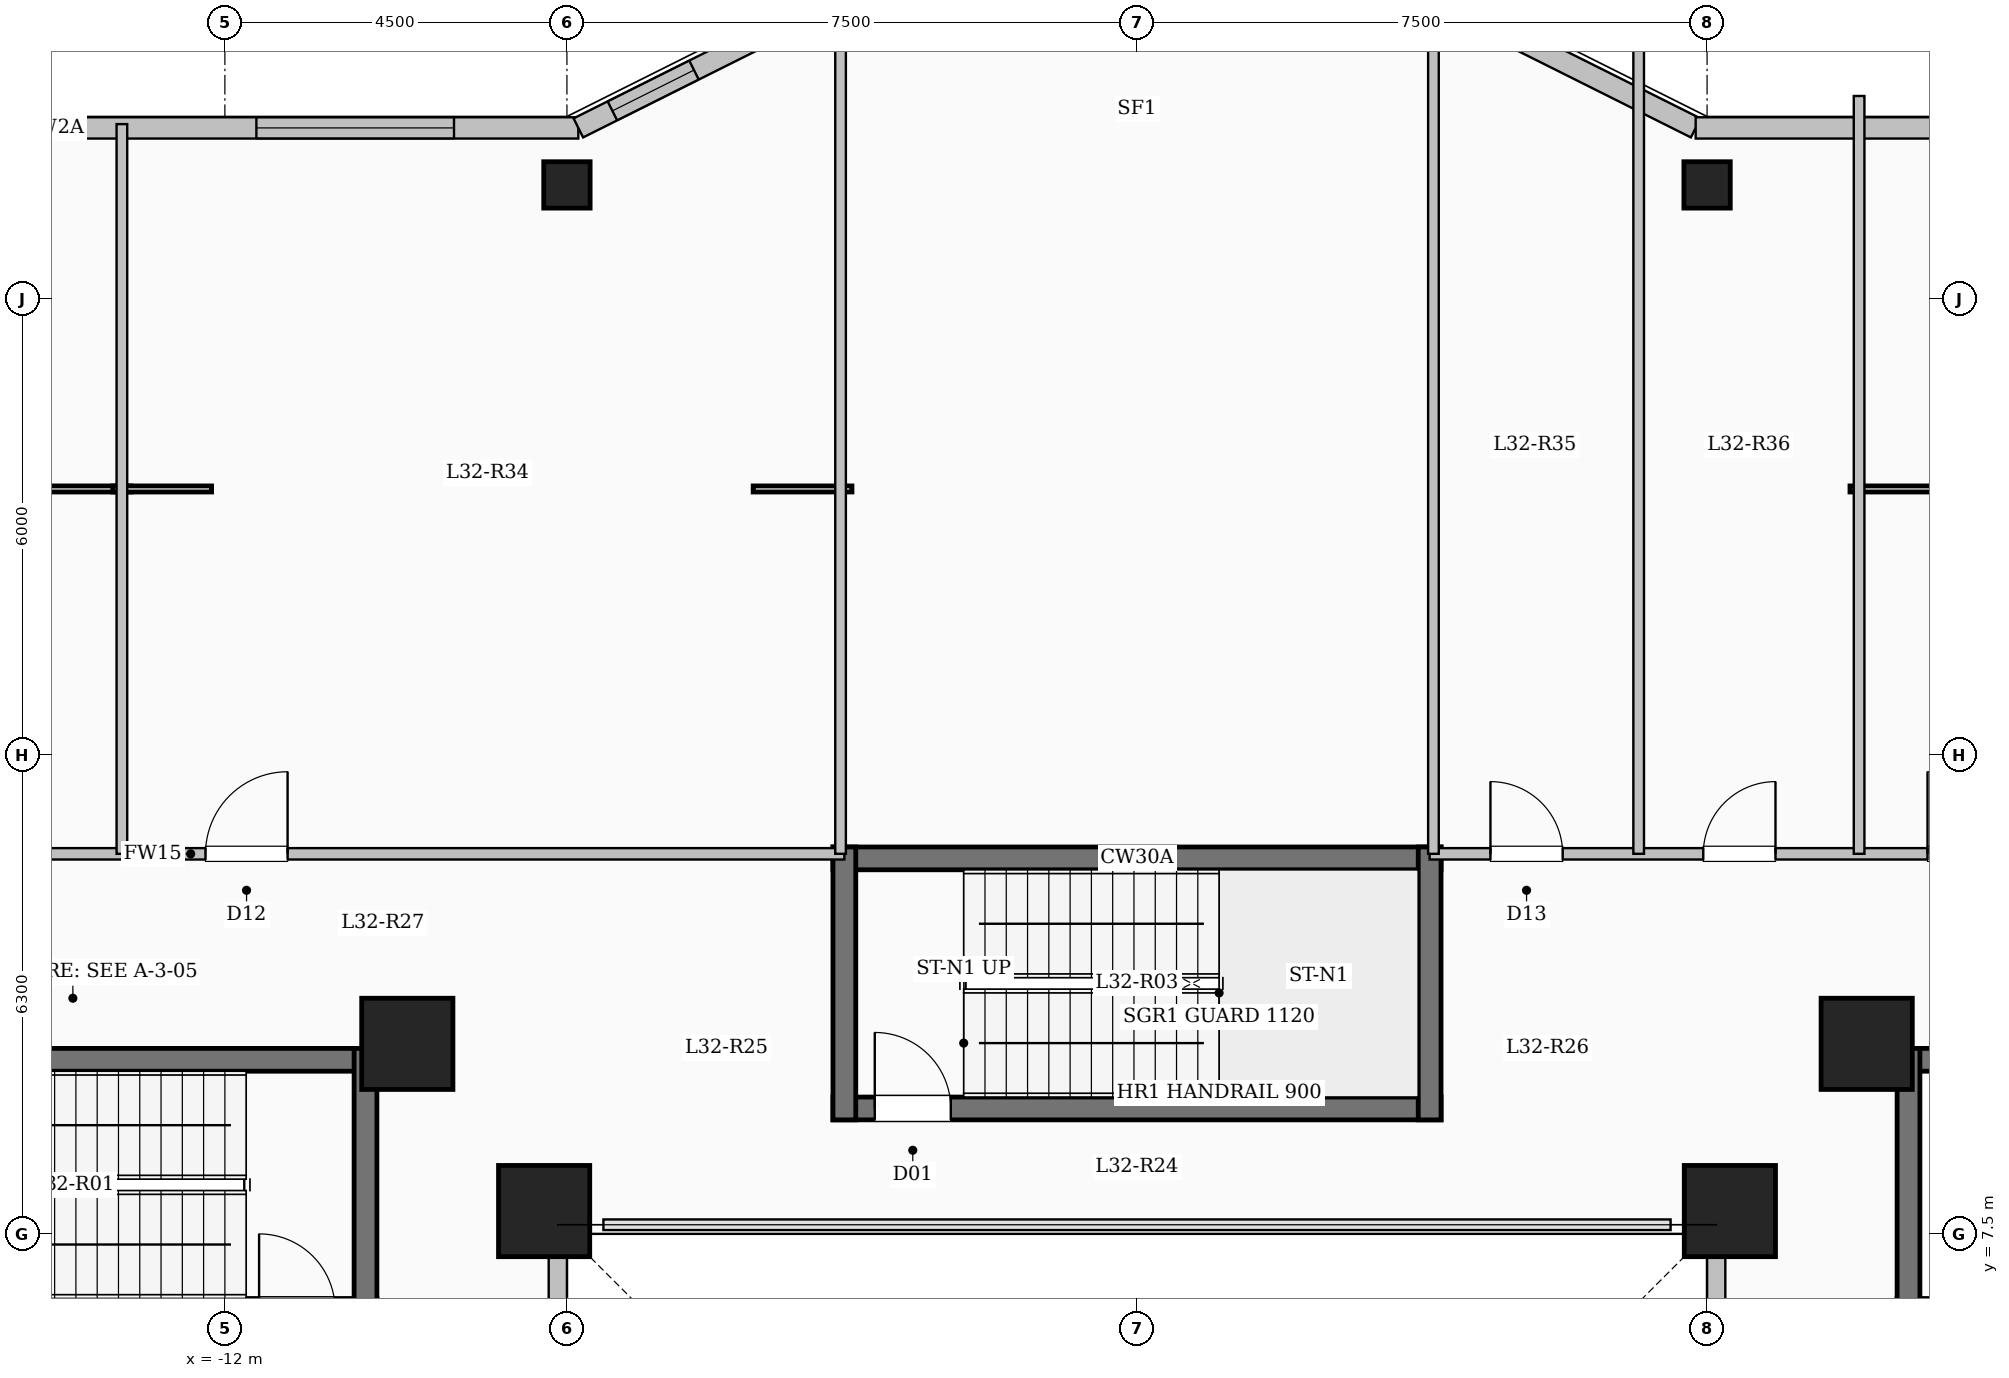
"""IFC4 building model, lengths in metres.
Left out: names, types, materials, properties, quantities, classifications, styles, units other than length and angle.
Written with IfcOpenShell. Run it as: python <this file> out.ifc"""

import sys

from ifc_helpers import new_model, si_unit, direction, frame, frame_2d, origin, origin_2d, place, context, subcontext, project, spatial, rectangle, hollow_circle, extrude, element, fill, save


model = new_model("IFC4")
c1 = context("Model", 3, precision=1e-05, world=origin(), true_north=direction((0.0, 1.0)))
c2 = subcontext(c1, "Body", "Model", "MODEL_VIEW")
j1 = project(units=[si_unit("LENGTHUNIT", "METRE"), si_unit("PLANEANGLEUNIT", "RADIAN")], contexts=[c1])
p1 = place(None, origin())
s1 = spatial("IfcSite", under=j1, at=p1, CompositionType="ELEMENT")
p2 = place(p1, origin())
s2 = spatial("IfcBuilding", under=s1, at=p2, CompositionType="ELEMENT")
p3 = place(p2, frame((0.0, 0.0, 118.5)))
s3 = spatial("IfcBuildingStorey", under=s2, at=p3, CompositionType="ELEMENT", Elevation=118.5)
for number, where, z_axis, x_axis in (
    (1, (-7.8, 7.8, 0.0), (0.0, 0.0, 1.0), (1.0, 0.0, 0.0)),
    (2, (7.8, 7.8, 0.0), (0.0, 0.0, 1.0), (1.0, 0.0, 0.0)),
    (3, (-9.6, 10.0, 0.0), (0.0, 0.0, 1.0), (1.0, 0.0, 0.0)),
    (4, (9.6, 10.0, 0.0), (0.0, 0.0, 1.0), (1.0, 0.0, 0.0)),
):
    element("IfcColumn", number, at=place(p3, frame(where, z_axis=z_axis, x_axis=x_axis)), inside=s3, PredefinedType="COLUMN", context=c2, shape_type="SweptSolid", body=[
        extrude(rectangle(XDim=1.2, YDim=1.2, at=origin_2d()), origin(), (0.0, 0.0, 1.0), 4.5),
    ])
for number, where, z_axis, x_axis in (
    (5, (-7.5, 21.3, 0.0), (0.0, 0.0, 1.0), (1.0, 0.0, 0.0)),
    (6, (7.5, 21.3, 0.0), (0.0, 0.0, 1.0), (1.0, 0.0, 0.0)),
):
    element("IfcColumn", number, at=place(p3, frame(where, z_axis=z_axis, x_axis=x_axis)), inside=s3, PredefinedType="COLUMN", context=c2, shape_type="SweptSolid", body=[
        extrude(hollow_circle(Radius=0.305, WallThickness=0.025, at=origin_2d()), origin(), (0.0, 0.0, 1.0), 4.5),
    ])
p4 = place(p3, frame((7.62, -7.62, 0.0), z_axis=(0.0, 0.0, 1.0), x_axis=(0.0, 1.0, 0.0)))
e7 = element("IfcWall", 7, at=p4, inside=s3, PredefinedType="SOLIDWALL", context=c2, shape_type="SweptSolid", body=[
    extrude(rectangle(XDim=15.24, YDim=0.24, at=frame_2d((7.62, 0.0))), origin(), (0.0, 0.0, 1.0), 4.2),
])
p5 = place(p4, frame((6.92, 0.0, 0.95)))
e8 = element("IfcOpeningElement", 8, at=p5, cuts=e7, PredefinedType="OPENING", context=c2, shape_type="SweptSolid", body=[
    extrude(rectangle(XDim=1.4, YDim=1.5, at=frame_2d((0.7, 0.75))), frame((0.0, 0.13, 0.0), z_axis=(0.0, -1.0, 0.0), x_axis=(1.0, 0.0, 0.0)), (0.0, 0.0, 1.0), 0.26),
])
p6 = place(p3, frame((-7.62, 7.62, 0.0), z_axis=(0.0, 0.0, 1.0), x_axis=(0.0, -1.0, 0.0)))
e9 = element("IfcWall", 9, at=p6, inside=s3, PredefinedType="SOLIDWALL", context=c2, shape_type="SweptSolid", body=[
    extrude(rectangle(XDim=15.24, YDim=0.24, at=frame_2d((7.62, 0.0))), origin(), (0.0, 0.0, 1.0), 4.2),
])
p7 = place(p6, frame((6.92, 0.0, 0.95)))
e10 = element("IfcOpeningElement", 10, at=p7, cuts=e9, PredefinedType="OPENING", context=c2, shape_type="SweptSolid", body=[
    extrude(rectangle(XDim=1.4, YDim=1.5, at=frame_2d((0.7, 0.75))), frame((0.0, 0.13, 0.0), z_axis=(0.0, -1.0, 0.0), x_axis=(1.0, 0.0, 0.0)), (0.0, 0.0, 1.0), 0.26),
])
p8 = place(p3, frame((-21.15, 22.05, 0.0), z_axis=(0.0, 0.0, 1.0), x_axis=(1.0, 0.0, 0.0)))
e11 = element("IfcWall", 11, at=p8, inside=s3, PredefinedType="SOLIDWALL", context=c2, shape_type="SweptSolid", body=[
    extrude(rectangle(XDim=13.8, YDim=0.28, at=frame_2d((6.9, 0.0))), origin(), (0.0, 0.0, 1.0), 4.2),
])
p9 = place(p8, frame((2.589, 0.0, 0.85)))
e12 = element("IfcOpeningElement", 12, at=p9, cuts=e11, PredefinedType="OPENING", context=c2, shape_type="SweptSolid", body=[
    extrude(rectangle(XDim=2.6, YDim=2.4, at=frame_2d((1.3, 1.2))), frame((0.0, 0.15, 0.0), z_axis=(0.0, -1.0, 0.0), x_axis=(1.0, 0.0, 0.0)), (0.0, 0.0, 1.0), 0.3),
])
p10 = place(p8, frame((9.564, 0.0, 0.85)))
e13 = element("IfcOpeningElement", 13, at=p10, cuts=e11, PredefinedType="OPENING", context=c2, shape_type="SweptSolid", body=[
    extrude(rectangle(XDim=2.6, YDim=2.4, at=frame_2d((1.3, 1.2))), frame((0.0, 0.15, 0.0), z_axis=(0.0, -1.0, 0.0), x_axis=(1.0, 0.0, 0.0)), (0.0, 0.0, 1.0), 0.3),
])
p11 = place(p3, frame((-7.35, 22.05, 0.0), z_axis=(0.0, 0.0, 1.0), x_axis=(0.894427191, 0.4472135955, 0.0)))
e14 = element("IfcWall", 14, at=p11, inside=s3, PredefinedType="SOLIDWALL", context=c2, shape_type="SweptSolid", body=[
    extrude(rectangle(XDim=3.354, YDim=0.28, at=frame_2d((1.677, 0.0))), origin(), (0.0, 0.0, 1.0), 4.2),
])
p12 = place(p11, frame((0.501, 0.0, 0.95)))
e15 = element("IfcOpeningElement", 15, at=p12, cuts=e14, PredefinedType="OPENING", context=c2, shape_type="SweptSolid", body=[
    extrude(rectangle(XDim=1.2, YDim=1.5, at=frame_2d((0.6, 0.75))), frame((0.0, 0.15, 0.0), z_axis=(0.0, -1.0, 0.0), x_axis=(1.0, 0.0, 0.0)), (0.0, 0.0, 1.0), 0.3),
])
p13 = place(p3, frame((4.35, 23.55, 0.0), z_axis=(0.0, 0.0, 1.0), x_axis=(0.894427191, -0.4472135955, 0.0)))
e16 = element("IfcWall", 16, at=p13, inside=s3, PredefinedType="SOLIDWALL", context=c2, shape_type="SweptSolid", body=[
    extrude(rectangle(XDim=3.354, YDim=0.28, at=frame_2d((1.677, 0.0))), origin(), (0.0, 0.0, 1.0), 4.2),
])
p14 = place(p3, frame((7.35, 22.05, 0.0), z_axis=(0.0, 0.0, 1.0), x_axis=(1.0, 0.0, 0.0)))
e17 = element("IfcWall", 17, at=p14, inside=s3, PredefinedType="SOLIDWALL", context=c2, shape_type="SweptSolid", body=[
    extrude(rectangle(XDim=13.8, YDim=0.28, at=frame_2d((6.9, 0.0))), origin(), (0.0, 0.0, 1.0), 4.2),
])
p15 = place(p14, frame((3.467, 0.0, 0.85)))
e18 = element("IfcOpeningElement", 18, at=p15, cuts=e17, PredefinedType="OPENING", context=c2, shape_type="SweptSolid", body=[
    extrude(rectangle(XDim=2.6, YDim=2.4, at=frame_2d((1.3, 1.2))), frame((0.0, 0.15, 0.0), z_axis=(0.0, -1.0, 0.0), x_axis=(1.0, 0.0, 0.0)), (0.0, 0.0, 1.0), 0.3),
])
p16 = place(p14, frame((9.263, 0.0, 0.85)))
e19 = element("IfcOpeningElement", 19, at=p16, cuts=e17, PredefinedType="OPENING", context=c2, shape_type="SweptSolid", body=[
    extrude(rectangle(XDim=2.6, YDim=2.4, at=frame_2d((1.3, 1.2))), frame((0.0, 0.15, 0.0), z_axis=(0.0, -1.0, 0.0), x_axis=(1.0, 0.0, 0.0)), (0.0, 0.0, 1.0), 0.3),
])
p17 = place(p3, frame((-18.0, 9.79, 0.0), z_axis=(0.0, 0.0, 1.0), x_axis=(1.0, 0.0, 0.0)))
e20 = element("IfcWall", 20, at=p17, inside=s3, PredefinedType="SHEAR", context=c2, shape_type="SweptSolid", body=[
    extrude(rectangle(XDim=8.0, YDim=0.3, at=frame_2d((4.0, 0.0))), origin(), (0.0, 0.0, 1.0), 4.5),
])
p18 = place(p3, frame((-18.0, 6.5, 0.0), z_axis=(0.0, 0.0, 1.0), x_axis=(1.0, 0.0, 0.0)))
e21 = element("IfcWall", 21, at=p18, inside=s3, PredefinedType="SHEAR", context=c2, shape_type="SweptSolid", body=[
    extrude(rectangle(XDim=8.0, YDim=0.3, at=frame_2d((4.0, 0.0))), origin(), (0.0, 0.0, 1.0), 4.5),
])
p19 = place(p18, frame((6.45, 0.0, 0.0)))
e22 = element("IfcOpeningElement", 22, at=p19, cuts=e21, PredefinedType="OPENING", context=c2, shape_type="SweptSolid", body=[
    extrude(rectangle(XDim=1.0, YDim=2.15, at=frame_2d((0.5, 1.075))), frame((0.0, 0.16, 0.0), z_axis=(0.0, -1.0, 0.0), x_axis=(1.0, 0.0, 0.0)), (0.0, 0.0, 1.0), 0.32),
])
p20 = place(p3, frame((-10.15, 6.35, 0.0), z_axis=(0.0, 0.0, 1.0), x_axis=(0.0, 1.0, 0.0)))
e23 = element("IfcWall", 23, at=p20, inside=s3, PredefinedType="SHEAR", context=c2, shape_type="SweptSolid", body=[
    extrude(rectangle(XDim=3.59, YDim=0.3, at=frame_2d((1.795, 0.0))), origin(), (0.0, 0.0, 1.0), 4.5),
])
p21 = place(p3, frame((10.0, 9.79, 0.0), z_axis=(0.0, 0.0, 1.0), x_axis=(1.0, 0.0, 0.0)))
e24 = element("IfcWall", 24, at=p21, inside=s3, PredefinedType="SHEAR", context=c2, shape_type="SweptSolid", body=[
    extrude(rectangle(XDim=8.0, YDim=0.3, at=frame_2d((4.0, 0.0))), origin(), (0.0, 0.0, 1.0), 4.5),
])
p22 = place(p3, frame((10.0, 6.5, 0.0), z_axis=(0.0, 0.0, 1.0), x_axis=(1.0, 0.0, 0.0)))
e25 = element("IfcWall", 25, at=p22, inside=s3, PredefinedType="SHEAR", context=c2, shape_type="SweptSolid", body=[
    extrude(rectangle(XDim=8.0, YDim=0.3, at=frame_2d((4.0, 0.0))), origin(), (0.0, 0.0, 1.0), 4.5),
])
p23 = place(p22, frame((0.55, 0.0, 0.0)))
e26 = element("IfcOpeningElement", 26, at=p23, cuts=e25, PredefinedType="OPENING", context=c2, shape_type="SweptSolid", body=[
    extrude(rectangle(XDim=1.0, YDim=2.15, at=frame_2d((0.5, 1.075))), frame((0.0, 0.16, 0.0), z_axis=(0.0, -1.0, 0.0), x_axis=(1.0, 0.0, 0.0)), (0.0, 0.0, 1.0), 0.32),
])
p24 = place(p3, frame((10.15, 6.35, 0.0), z_axis=(0.0, 0.0, 1.0), x_axis=(0.0, 1.0, 0.0)))
e27 = element("IfcWall", 27, at=p24, inside=s3, PredefinedType="SHEAR", context=c2, shape_type="SweptSolid", body=[
    extrude(rectangle(XDim=3.59, YDim=0.3, at=frame_2d((1.795, 0.0))), origin(), (0.0, 0.0, 1.0), 4.5),
])
p25 = place(p3, frame((-4.0, 12.44, 0.0), z_axis=(0.0, 0.0, 1.0), x_axis=(1.0, 0.0, 0.0)))
e28 = element("IfcWall", 28, at=p25, inside=s3, PredefinedType="SHEAR", context=c2, shape_type="SweptSolid", body=[
    extrude(rectangle(XDim=8.0, YDim=0.3, at=frame_2d((4.0, 0.0))), origin(), (0.0, 0.0, 1.0), 4.5),
])
p26 = place(p3, frame((-4.0, 9.15, 0.0), z_axis=(0.0, 0.0, 1.0), x_axis=(1.0, 0.0, 0.0)))
e29 = element("IfcWall", 29, at=p26, inside=s3, PredefinedType="SHEAR", context=c2, shape_type="SweptSolid", body=[
    extrude(rectangle(XDim=8.0, YDim=0.3, at=frame_2d((4.0, 0.0))), origin(), (0.0, 0.0, 1.0), 4.5),
])
p27 = place(p26, frame((0.55, 0.0, 0.0)))
e30 = element("IfcOpeningElement", 30, at=p27, cuts=e29, PredefinedType="OPENING", context=c2, shape_type="SweptSolid", body=[
    extrude(rectangle(XDim=1.0, YDim=2.15, at=frame_2d((0.5, 1.075))), frame((0.0, 0.16, 0.0), z_axis=(0.0, -1.0, 0.0), x_axis=(1.0, 0.0, 0.0)), (0.0, 0.0, 1.0), 0.32),
])
for number, where, z_axis, x_axis in (
    (31, (-3.85, 9.0, 0.0), (0.0, 0.0, 1.0), (0.0, 1.0, 0.0)),
    (32, (3.85, 9.0, 0.0), (0.0, 0.0, 1.0), (0.0, 1.0, 0.0)),
):
    element("IfcWall", number, at=place(p3, frame(where, z_axis=z_axis, x_axis=x_axis)), inside=s3, PredefinedType="SHEAR", context=c2, shape_type="SweptSolid", body=[
        extrude(rectangle(XDim=3.59, YDim=0.3, at=frame_2d((1.795, 0.0))), origin(), (0.0, 0.0, 1.0), 4.5),
    ])
p28 = place(p3, frame((-21.05, 12.5, 0.0), z_axis=(0.0, 0.0, 1.0), x_axis=(1.0, 0.0, 0.0)))
e33 = element("IfcWall", 33, at=p28, inside=s3, PredefinedType="PARTITIONING", context=c2, shape_type="SweptSolid", body=[
    extrude(rectangle(XDim=17.2, YDim=0.15, at=frame_2d((8.6, 0.0))), origin(), (0.0, 0.0, 1.0), 4.2),
])
p29 = place(p28, frame((1.2, 0.0, 0.0)))
e34 = element("IfcOpeningElement", 34, at=p29, cuts=e33, PredefinedType="OPENING", context=c2, shape_type="SweptSolid", body=[
    extrude(rectangle(XDim=1.2, YDim=2.15, at=frame_2d((0.6, 1.075))), frame((0.0, 0.085, 0.0), z_axis=(0.0, -1.0, 0.0), x_axis=(1.0, 0.0, 0.0)), (0.0, 0.0, 1.0), 0.17),
])
p30 = place(p28, frame((8.795, 0.0, 0.0)))
e35 = element("IfcOpeningElement", 35, at=p30, cuts=e33, PredefinedType="OPENING", context=c2, shape_type="SweptSolid", body=[
    extrude(rectangle(XDim=1.08, YDim=2.15, at=frame_2d((0.54, 1.075))), frame((0.0, 0.085, 0.0), z_axis=(0.0, -1.0, 0.0), x_axis=(1.0, 0.0, 0.0)), (0.0, 0.0, 1.0), 0.17),
])
p31 = place(p3, frame((3.85, 12.5, 0.0), z_axis=(0.0, 0.0, 1.0), x_axis=(1.0, 0.0, 0.0)))
e36 = element("IfcWall", 36, at=p31, inside=s3, PredefinedType="PARTITIONING", context=c2, shape_type="SweptSolid", body=[
    extrude(rectangle(XDim=17.2, YDim=0.15, at=frame_2d((8.6, 0.0))), origin(), (0.0, 0.0, 1.0), 4.2),
])
p32 = place(p31, frame((0.8, 0.0, 0.0)))
e37 = element("IfcOpeningElement", 37, at=p32, cuts=e36, PredefinedType="OPENING", context=c2, shape_type="SweptSolid", body=[
    extrude(rectangle(XDim=0.95, YDim=2.15, at=frame_2d((0.475, 1.075))), frame((0.0, 0.085, 0.0), z_axis=(0.0, -1.0, 0.0), x_axis=(1.0, 0.0, 0.0)), (0.0, 0.0, 1.0), 0.17),
])
p33 = place(p31, frame((3.6, 0.0, 0.0)))
e38 = element("IfcOpeningElement", 38, at=p33, cuts=e36, PredefinedType="OPENING", context=c2, shape_type="SweptSolid", body=[
    extrude(rectangle(XDim=0.95, YDim=2.15, at=frame_2d((0.475, 1.075))), frame((0.0, 0.085, 0.0), z_axis=(0.0, -1.0, 0.0), x_axis=(1.0, 0.0, 0.0)), (0.0, 0.0, 1.0), 0.17),
])
p34 = place(p31, frame((6.55, 0.0, 0.0)))
e39 = element("IfcOpeningElement", 39, at=p34, cuts=e36, PredefinedType="OPENING", context=c2, shape_type="SweptSolid", body=[
    extrude(rectangle(XDim=1.08, YDim=2.15, at=frame_2d((0.54, 1.075))), frame((0.0, 0.085, 0.0), z_axis=(0.0, -1.0, 0.0), x_axis=(1.0, 0.0, 0.0)), (0.0, 0.0, 1.0), 0.17),
])
p35 = place(p31, frame((11.947, 0.0, 0.0)))
e40 = element("IfcOpeningElement", 40, at=p35, cuts=e36, PredefinedType="OPENING", context=c2, shape_type="SweptSolid", body=[
    extrude(rectangle(XDim=1.2, YDim=2.15, at=frame_2d((0.6, 1.075))), frame((0.0, 0.085, 0.0), z_axis=(0.0, -1.0, 0.0), x_axis=(1.0, 0.0, 0.0)), (0.0, 0.0, 1.0), 0.17),
])
for number, where, z_axis, x_axis in (
    (41, (-3.9, 12.5, 0.0), (0.0, 0.0, 1.0), (0.0, 1.0, 0.0)),
    (42, (3.9, 12.5, 0.0), (0.0, 0.0, 1.0), (0.0, 1.0, 0.0)),
):
    element("IfcWall", number, at=place(p3, frame(where, z_axis=z_axis, x_axis=x_axis)), inside=s3, PredefinedType="PARTITIONING", context=c2, shape_type="SweptSolid", body=[
        extrude(rectangle(XDim=11.08, YDim=0.14, at=frame_2d((5.54, 0.0))), origin(), (0.0, 0.0, 1.0), 4.2),
    ])
p36 = place(p3, frame((-13.355, 12.5, 0.0), z_axis=(0.0, 0.0, 1.0), x_axis=(0.0, 1.0, 0.0)))
e43 = element("IfcWall", 43, at=p36, inside=s3, PredefinedType="PARTITIONING", context=c2, shape_type="SweptSolid", body=[
    extrude(rectangle(XDim=9.6, YDim=0.14, at=frame_2d((4.8, 0.0))), origin(), (0.0, 0.0, 1.0), 4.2),
])
p37 = place(p3, frame((6.6, 12.5, 0.0), z_axis=(0.0, 0.0, 1.0), x_axis=(0.0, 1.0, 0.0)))
e44 = element("IfcWall", 44, at=p37, inside=s3, PredefinedType="PARTITIONING", context=c2, shape_type="SweptSolid", body=[
    extrude(rectangle(XDim=10.685, YDim=0.14, at=frame_2d((5.343, 0.0))), origin(), (0.0, 0.0, 1.0), 4.2),
])
p38 = place(p3, frame((9.5, 12.5, 0.0), z_axis=(0.0, 0.0, 1.0), x_axis=(0.0, 1.0, 0.0)))
e45 = element("IfcWall", 45, at=p38, inside=s3, PredefinedType="PARTITIONING", context=c2, shape_type="SweptSolid", body=[
    extrude(rectangle(XDim=9.97, YDim=0.14, at=frame_2d((4.985, 0.0))), origin(), (0.0, 0.0, 1.0), 4.2),
])
p39 = place(p10, origin())
e46 = element("IfcWindow", 46, at=p39, inside=s3, PartitioningType="SINGLE_PANEL", PredefinedType="WINDOW", context=c2, shape_type="SweptSolid", body=[
    extrude(rectangle(XDim=2.6, YDim=2.4, at=frame_2d((1.3, 1.2))), frame((0.0, 0.03, 0.0), z_axis=(0.0, -1.0, 0.0), x_axis=(1.0, 0.0, 0.0)), (0.0, 0.0, 1.0), 0.06),
])
fill(e13, e46)
p40 = place(p12, origin())
e47 = element("IfcWindow", 47, at=p40, inside=s3, PartitioningType="SINGLE_PANEL", PredefinedType="WINDOW", context=c2, shape_type="SweptSolid", body=[
    extrude(rectangle(XDim=1.2, YDim=1.5, at=frame_2d((0.6, 0.75))), frame((0.0, 0.03, 0.0), z_axis=(0.0, -1.0, 0.0), x_axis=(1.0, 0.0, 0.0)), (0.0, 0.0, 1.0), 0.06),
])
fill(e15, e47)
p41 = place(p27, origin())
e48 = element("IfcDoor", 48, at=p41, inside=s3, OperationType="SINGLE_SWING_LEFT", PredefinedType="DOOR", context=c2, shape_type="SweptSolid", body=[
    extrude(rectangle(XDim=1.0, YDim=2.15, at=frame_2d((0.5, 1.075))), frame((0.0, 0.025, 0.0), z_axis=(0.0, -1.0, 0.0), x_axis=(1.0, 0.0, 0.0)), (0.0, 0.0, 1.0), 0.05),
])
fill(e30, e48)
p42 = place(p30, origin())
e49 = element("IfcDoor", 49, at=p42, inside=s3, OperationType="SINGLE_SWING_RIGHT", PredefinedType="DOOR", context=c2, shape_type="SweptSolid", body=[
    extrude(rectangle(XDim=1.08, YDim=2.15, at=frame_2d((0.54, 1.075))), frame((0.0, 0.025, 0.0), z_axis=(0.0, -1.0, 0.0), x_axis=(1.0, 0.0, 0.0)), (0.0, 0.0, 1.0), 0.05),
])
fill(e35, e49)
p43 = place(p32, origin())
e50 = element("IfcDoor", 50, at=p43, inside=s3, OperationType="SINGLE_SWING_LEFT", PredefinedType="DOOR", context=c2, shape_type="SweptSolid", body=[
    extrude(rectangle(XDim=0.95, YDim=2.15, at=frame_2d((0.475, 1.075))), frame((0.0, 0.025, 0.0), z_axis=(0.0, -1.0, 0.0), x_axis=(1.0, 0.0, 0.0)), (0.0, 0.0, 1.0), 0.05),
])
fill(e37, e50)
p44 = place(p33, origin())
e51 = element("IfcDoor", 51, at=p44, inside=s3, OperationType="SINGLE_SWING_RIGHT", PredefinedType="DOOR", context=c2, shape_type="SweptSolid", body=[
    extrude(rectangle(XDim=0.95, YDim=2.15, at=frame_2d((0.475, 1.075))), frame((0.0, 0.025, 0.0), z_axis=(0.0, -1.0, 0.0), x_axis=(1.0, 0.0, 0.0)), (0.0, 0.0, 1.0), 0.05),
])
fill(e38, e51)
p45 = place(p34, origin())
e52 = element("IfcDoor", 52, at=p45, inside=s3, OperationType="SINGLE_SWING_LEFT", PredefinedType="DOOR", context=c2, shape_type="SweptSolid", body=[
    extrude(rectangle(XDim=1.08, YDim=2.15, at=frame_2d((0.54, 1.075))), frame((0.0, 0.025, 0.0), z_axis=(0.0, -1.0, 0.0), x_axis=(1.0, 0.0, 0.0)), (0.0, 0.0, 1.0), 0.05),
])
fill(e39, e52)
save(model, sys.argv[1])
